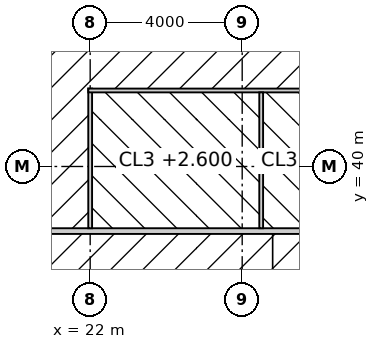
"""IFC4 building model, lengths in metres.
Left out: names, types, materials, properties, quantities, classifications, styles, units other than length and angle.
Written with IfcOpenShell. Run it as: python <this file> out.ifc"""

import sys

from ifc_helpers import new_model, si_unit, direction, frame, frame_2d, origin, place, context, subcontext, project, spatial, rectangle, extrude, element, fill, save


model = new_model("IFC4")
c1 = context("Model", 3, precision=1e-05, world=origin(), true_north=direction((0.0, 1.0)))
c2 = subcontext(c1, "Body", "Model", "MODEL_VIEW")
j1 = project(units=[si_unit("LENGTHUNIT", "METRE"), si_unit("PLANEANGLEUNIT", "RADIAN")], contexts=[c1])
p1 = place(None, origin())
s1 = spatial("IfcSite", under=j1, at=p1, CompositionType="ELEMENT")
p2 = place(p1, origin())
s2 = spatial("IfcBuilding", under=s1, at=p2, CompositionType="ELEMENT")
p3 = place(p2, frame((0.0, 0.0, 81.4)))
s3 = spatial("IfcBuildingStorey", under=s2, at=p3, CompositionType="ELEMENT", Elevation=81.4)
p4 = place(p3, frame((15.775, 38.3, 0.0), z_axis=(0.0, 0.0, 1.0), x_axis=(1.0, 0.0, 0.0)))
e1 = element("IfcWall", 1, at=p4, inside=s3, PredefinedType="PARTITIONING", context=c2, shape_type="SweptSolid", body=[
    extrude(rectangle(XDim=22.05, YDim=0.15, at=frame_2d((11.025, 0.0))), origin(), (0.0, 0.0, 1.0), 3.85),
])
p5 = place(p4, frame((7.975, 0.0, 0.0)))
e2 = element("IfcOpeningElement", 2, at=p5, cuts=e1, PredefinedType="OPENING", context=c2, shape_type="SweptSolid", body=[
    extrude(rectangle(XDim=0.9, YDim=2.1, at=frame_2d((0.45, 1.05))), frame((0.0, 0.085, 0.0), z_axis=(0.0, -1.0, 0.0), x_axis=(1.0, 0.0, 0.0)), (0.0, 0.0, 1.0), 0.17),
])
p6 = place(p4, frame((11.725, 0.0, 0.0)))
e3 = element("IfcOpeningElement", 3, at=p6, cuts=e1, PredefinedType="OPENING", context=c2, shape_type="SweptSolid", body=[
    extrude(rectangle(XDim=1.0, YDim=2.1, at=frame_2d((0.5, 1.05))), frame((0.0, 0.085, 0.0), z_axis=(0.0, -1.0, 0.0), x_axis=(1.0, 0.0, 0.0)), (0.0, 0.0, 1.0), 0.17),
])
p7 = place(p4, frame((15.575, 0.0, 0.0)))
e4 = element("IfcOpeningElement", 4, at=p7, cuts=e1, PredefinedType="OPENING", context=c2, shape_type="SweptSolid", body=[
    extrude(rectangle(XDim=0.9, YDim=2.1, at=frame_2d((0.45, 1.05))), frame((0.0, 0.085, 0.0), z_axis=(0.0, -1.0, 0.0), x_axis=(1.0, 0.0, 0.0)), (0.0, 0.0, 1.0), 0.17),
])
p8 = place(p3, frame((22.0, 38.375, 0.0), z_axis=(0.0, 0.0, 1.0), x_axis=(0.0, 1.0, 0.0)))
e5 = element("IfcWall", 5, at=p8, inside=s3, PredefinedType="PARTITIONING", context=c2, shape_type="SweptSolid", body=[
    extrude(rectangle(XDim=3.675, YDim=0.1, at=frame_2d((1.837, 0.0))), origin(), (0.0, 0.0, 1.0), 2.95),
])
p9 = place(p3, frame((21.95, 42.0, 0.0), z_axis=(0.0, 0.0, 1.0), x_axis=(1.0, 0.0, 0.0)))
e6 = element("IfcWall", 6, at=p9, inside=s3, PredefinedType="PARTITIONING", context=c2, shape_type="SweptSolid", body=[
    extrude(rectangle(XDim=12.1, YDim=0.1, at=frame_2d((6.05, 0.0))), origin(), (0.0, 0.0, 1.0), 3.85),
])
p10 = place(p3, frame((26.5, 38.375, 0.0), z_axis=(0.0, 0.0, 1.0), x_axis=(0.0, 1.0, 0.0)))
e7 = element("IfcWall", 7, at=p10, inside=s3, PredefinedType="PARTITIONING", context=c2, shape_type="SweptSolid", body=[
    extrude(rectangle(XDim=3.575, YDim=0.1, at=frame_2d((1.788, 0.0))), origin(), (0.0, 0.0, 1.0), 3.85),
])
p11 = place(p5, origin())
e8 = element("IfcDoor", 8, at=p11, inside=s3, OperationType="SINGLE_SWING_LEFT", PredefinedType="DOOR", context=c2, shape_type="SweptSolid", body=[
    extrude(rectangle(XDim=0.9, YDim=2.1, at=frame_2d((0.45, 1.05))), frame((0.0, 0.025, 0.0), z_axis=(0.0, -1.0, 0.0), x_axis=(1.0, 0.0, 0.0)), (0.0, 0.0, 1.0), 0.05),
])
fill(e2, e8)
save(model, sys.argv[1])
